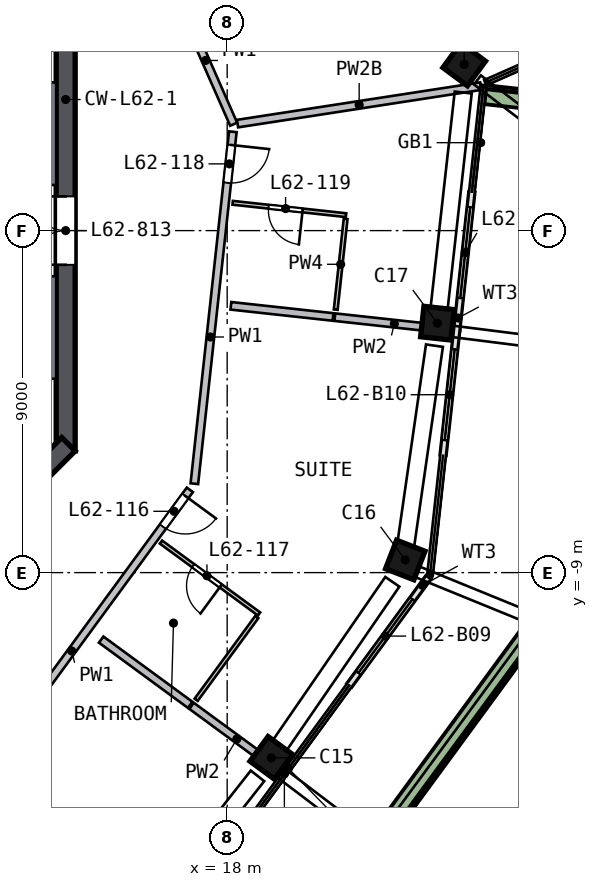
"""IFC4 building model, lengths in metres.
Left out: names, types, materials, properties, quantities, classifications, styles, units other than length and angle.
Written with IfcOpenShell. Run it as: python <this file> out.ifc"""

import sys

from ifc_helpers import new_model, si_unit, direction, frame, frame_2d, origin, origin_2d, place, context, subcontext, project, spatial, polyline, rectangle, outline, extrude, element, fill, save


model = new_model("IFC4")
c1 = context("Model", 3, precision=1e-05, world=origin(), true_north=direction((0.0, 1.0)))
c2 = subcontext(c1, "Body", "Model", "MODEL_VIEW")
j1 = project(units=[si_unit("LENGTHUNIT", "METRE"), si_unit("PLANEANGLEUNIT", "RADIAN")], contexts=[c1])
p1 = place(None, origin())
s1 = spatial("IfcSite", under=j1, at=p1, CompositionType="ELEMENT")
p2 = place(p1, origin())
s2 = spatial("IfcBuilding", under=s1, at=p2, CompositionType="ELEMENT")
p3 = place(p2, frame((0.0, 0.0, 252.5)))
s3 = spatial("IfcBuildingStorey", under=s2, at=p3, CompositionType="ELEMENT", Elevation=252.5)
p4 = place(p3, frame((19.082, -13.986, 0.0), z_axis=(0.065781659, 0.09133384, 0.99364526), x_axis=(0.587536537, 0.80133178, -0.112553082)))
e1 = element("IfcColumn", 1, at=p4, inside=s3, PredefinedType="COLUMN", context=c2, shape_type="SweptSolid", body=[
    extrude(rectangle(XDim=0.8, YDim=0.8, at=origin_2d()), origin(), (0.0, 0.0, 1.0), 3.21),
])
p5 = place(p3, frame((22.636, -8.798, 0.0), z_axis=(0.040976181, 0.107952091, 0.99331128), x_axis=(-0.360370814, -0.925635524, 0.115463211)))
e2 = element("IfcColumn", 2, at=p5, inside=s3, PredefinedType="COLUMN", context=c2, shape_type="SweptSolid", body=[
    extrude(rectangle(XDim=0.8, YDim=0.8, at=origin_2d()), origin(), (0.0, 0.0, 1.0), 3.211),
])
p6 = place(p3, frame((23.518, -2.572, 0.0), z_axis=(0.011255095, 0.112018614, 0.993642367), x_axis=(0.107722097, 0.987786416, -0.112578621)))
e3 = element("IfcColumn", 3, at=p6, inside=s3, PredefinedType="COLUMN", context=c2, shape_type="SweptSolid", body=[
    extrude(rectangle(XDim=0.8, YDim=0.8, at=origin_2d()), origin(), (0.0, 0.0, 1.0), 3.21),
])
p7 = place(p3, frame((24.262, 4.234, 0.0), z_axis=(-0.021054304, 0.115152599, 0.993124662), x_axis=(-0.595047118, -0.799688395, 0.080108669)))
e4 = element("IfcColumn", 4, at=p7, inside=s3, PredefinedType="COLUMN", context=c2, shape_type="SweptSolid", body=[
    extrude(rectangle(XDim=0.8, YDim=0.8, at=origin_2d()), origin(), (0.0, 0.0, 1.0), 3.212),
])
p8 = place(p3, frame((13.75, -5.799, 0.0), z_axis=(0.0, 0.0, 1.0), x_axis=(0.0, 1.0, 0.0)))
e5 = element("IfcWall", 5, at=p8, inside=s3, PredefinedType="SHEAR", context=c2, shape_type="SweptSolid", body=[
    extrude(rectangle(XDim=11.598, YDim=0.5, at=frame_2d((5.799, 0.0))), origin(), (0.0, 0.0, 1.0), 3.5),
])
p9 = place(p8, frame((4.899, 0.0, 0.0)))
e6 = element("IfcOpeningElement", 6, at=p9, cuts=e5, PredefinedType="OPENING", context=c2, shape_type="SweptSolid", body=[
    extrude(rectangle(XDim=1.8, YDim=2.1, at=frame_2d((0.9, 1.05))), frame((0.0, 0.26, 0.0), z_axis=(0.0, -1.0, 0.0), x_axis=(1.0, 0.0, 0.0)), (0.0, 0.0, 1.0), 0.52),
])
p10 = place(p3, frame((5.622, -13.823, 0.0), z_axis=(0.0, 0.0, 1.0), x_axis=(0.707106781, 0.707106781, 0.0)))
e7 = element("IfcWall", 7, at=p10, inside=s3, PredefinedType="SHEAR", context=c2, shape_type="SweptSolid", body=[
    extrude(rectangle(XDim=11.598, YDim=0.5, at=frame_2d((5.799, 0.0))), origin(), (0.0, 0.0, 1.0), 3.5),
])
p11 = place(p10, frame((2.099, 0.0, 0.0)))
e8 = element("IfcOpeningElement", 8, at=p11, cuts=e7, PredefinedType="OPENING", context=c2, shape_type="SweptSolid", body=[
    extrude(rectangle(XDim=1.2, YDim=2.1, at=frame_2d((0.6, 1.05))), frame((0.0, 0.26, 0.0), z_axis=(0.0, -1.0, 0.0), x_axis=(1.0, 0.0, 0.0)), (0.0, 0.0, 1.0), 0.52),
])
p12 = place(p3, frame((21.217, -11.961, 0.0), z_axis=(0.0, 0.0, 1.0), x_axis=(0.591179396, 0.806540093, 0.0)))
e9 = element("IfcWall", 9, at=p12, inside=s3, PredefinedType="SOLIDWALL", context=c2, shape_type="SweptSolid", body=[
    extrude(rectangle(XDim=3.504, YDim=0.15, at=frame_2d((1.752, 0.0))), origin(), (0.0, 0.0, 1.0), 2.525),
])
p13 = place(p12, frame((0.4, 0.0, 0.0)))
e10 = element("IfcOpeningElement", 10, at=p13, cuts=e9, PredefinedType="OPENING", context=c2, shape_type="SweptSolid", body=[
    extrude(rectangle(XDim=2.4, YDim=2.4, at=frame_2d((1.2, 1.2))), frame((0.0, 0.085, 0.0), z_axis=(0.0, -1.0, 0.0), x_axis=(1.0, 0.0, 0.0)), (0.0, 0.0, 1.0), 0.17),
])
p14 = place(p3, frame((23.681, -5.909, 0.0), z_axis=(0.0, 0.0, 1.0), x_axis=(0.108685466, 0.994076189, 0.0)))
e11 = element("IfcWall", 11, at=p14, inside=s3, PredefinedType="SOLIDWALL", context=c2, shape_type="SweptSolid", body=[
    extrude(rectangle(XDim=3.3, YDim=0.15, at=frame_2d((1.65, 0.0))), origin(), (0.0, 0.0, 1.0), 2.525),
])
p15 = place(p14, frame((0.4, 0.0, 0.0)))
e12 = element("IfcOpeningElement", 12, at=p15, cuts=e11, PredefinedType="OPENING", context=c2, shape_type="SweptSolid", body=[
    extrude(rectangle(XDim=2.4, YDim=2.4, at=frame_2d((1.2, 1.2))), frame((0.0, 0.085, 0.0), z_axis=(0.0, -1.0, 0.0), x_axis=(1.0, 0.0, 0.0)), (0.0, 0.0, 1.0), 0.17),
])
p16 = place(p3, frame((24.04, -2.629, 0.0), z_axis=(0.0, 0.0, 1.0), x_axis=(0.108689527, 0.994075745, 0.0)))
e13 = element("IfcWall", 13, at=p16, inside=s3, PredefinedType="SOLIDWALL", context=c2, shape_type="SweptSolid", body=[
    extrude(rectangle(XDim=3.661, YDim=0.15, at=frame_2d((1.831, 0.0))), origin(), (0.0, 0.0, 1.0), 2.525),
])
p17 = place(p16, frame((0.861, 0.0, 0.0)))
e14 = element("IfcOpeningElement", 14, at=p17, cuts=e13, PredefinedType="OPENING", context=c2, shape_type="SweptSolid", body=[
    extrude(rectangle(XDim=2.4, YDim=2.4, at=frame_2d((1.2, 1.2))), frame((0.0, 0.085, 0.0), z_axis=(0.0, -1.0, 0.0), x_axis=(1.0, 0.0, 0.0)), (0.0, 0.0, 1.0), 0.17),
])
p18 = place(p3, frame((18.398, -20.924, 0.0), z_axis=(0.0, 0.0, 1.0), x_axis=(0.591166749, 0.806549363, 0.0)))
e15 = element("IfcWall", 15, at=p18, inside=s3, PredefinedType="SOLIDWALL", context=c2, shape_type="SweptSolid", body=[
    extrude(rectangle(XDim=13.224, YDim=0.5, at=frame_2d((6.612, 0.0))), origin(), (0.0, 0.0, 1.0), 0.7),
])
p19 = place(p3, frame((27.478, 3.283, 0.0), z_axis=(0.0, 0.0, 1.0), x_axis=(-0.994071997, 0.108723798, 0.0)))
e16 = element("IfcWall", 16, at=p19, inside=s3, PredefinedType="SOLIDWALL", context=c2, shape_type="SweptSolid", body=[
    extrude(rectangle(XDim=2.699, YDim=0.5, at=frame_2d((1.35, 0.0))), origin(), (0.0, 0.0, 1.0), 0.7),
])
p20 = place(p3, origin())
e17 = element("IfcWall", 17, at=p20, inside=s3, PredefinedType="SOLIDWALL", context=c2, shape_type="SweptSolid", body=[
    extrude(outline(polyline([(13.5, -3.9), (9.9, -3.9), (9.9, -3.7), (12.9, -3.7), (12.9, -1.4), (9.9, -1.4), (9.9, -1.2), (13.5, -1.2), (13.5, -3.9)])), origin(), (0.0, 0.0, 1.0), 3.19),
])
p21 = place(p3, origin())
e18 = element("IfcWall", 18, at=p21, inside=s3, PredefinedType="SOLIDWALL", context=c2, shape_type="SweptSolid", body=[
    extrude(outline(polyline([(13.5, 3.9), (13.5, 1.2), (9.9, 1.2), (9.9, 1.4), (12.9, 1.4), (12.9, 3.7), (9.9, 3.7), (9.9, 3.9), (13.5, 3.9)])), origin(), (0.0, 0.0, 1.0), 3.19),
])
p22 = place(p3, frame((17.017, -6.822, 0.0), z_axis=(0.0, 0.0, 1.0), x_axis=(-0.591166262, -0.80654972, 0.0)))
e19 = element("IfcWall", 19, at=p22, inside=s3, PredefinedType="SOLIDWALL", context=c2, shape_type="SweptSolid", body=[
    extrude(rectangle(XDim=9.116, YDim=0.2, at=frame_2d((4.558, 0.0))), origin(), (0.0, 0.0, 1.0), 3.19),
])
p23 = place(p22, frame((0.2, 0.0, 0.0)))
e20 = element("IfcOpeningElement", 20, at=p23, cuts=e19, PredefinedType="OPENING", context=c2, shape_type="SweptSolid", body=[
    extrude(rectangle(XDim=1.0, YDim=2.1, at=frame_2d((0.5, 1.05))), frame((0.0, 0.11, 0.0), z_axis=(0.0, -1.0, 0.0), x_axis=(1.0, 0.0, 0.0)), (0.0, 0.0, 1.0), 0.22),
])
p24 = place(p3, frame((14.336, 11.51, 0.0), z_axis=(0.0, 0.0, 1.0), x_axis=(0.402913126, -0.915238227, 0.0)))
e21 = element("IfcWall", 21, at=p24, inside=s3, PredefinedType="SOLIDWALL", context=c2, shape_type="SweptSolid", body=[
    extrude(rectangle(XDim=9.517, YDim=0.2, at=frame_2d((4.758, 0.0))), origin(), (0.0, 0.0, 1.0), 3.19),
])
p25 = place(p24, frame((3.85, 0.0, 0.0)))
e22 = element("IfcOpeningElement", 22, at=p25, cuts=e21, PredefinedType="OPENING", context=c2, shape_type="SweptSolid", body=[
    extrude(rectangle(XDim=1.8, YDim=2.1, at=frame_2d((0.9, 1.05))), frame((0.0, 0.11, 0.0), z_axis=(0.0, -1.0, 0.0), x_axis=(1.0, 0.0, 0.0)), (0.0, 0.0, 1.0), 0.22),
])
p26 = place(p3, frame((18.149, 2.601, 0.0), z_axis=(0.0, 0.0, 1.0), x_axis=(-0.108702718, -0.994074303, 0.0)))
e23 = element("IfcWall", 23, at=p26, inside=s3, PredefinedType="SOLIDWALL", context=c2, shape_type="SweptSolid", body=[
    extrude(rectangle(XDim=9.316, YDim=0.2, at=frame_2d((4.658, 0.0))), origin(), (0.0, 0.0, 1.0), 3.19),
])
p27 = place(p26, frame((0.35, 0.0, 0.0)))
e24 = element("IfcOpeningElement", 24, at=p27, cuts=e23, PredefinedType="OPENING", context=c2, shape_type="SweptSolid", body=[
    extrude(rectangle(XDim=1.0, YDim=2.1, at=frame_2d((0.5, 1.05))), frame((0.0, 0.11, 0.0), z_axis=(0.0, -1.0, 0.0), x_axis=(1.0, 0.0, 0.0)), (0.0, 0.0, 1.0), 0.22),
])
p28 = place(p3, frame((14.684, -10.763, 0.0), z_axis=(0.0, 0.0, 1.0), x_axis=(0.806597338, -0.59110129, 0.0)))
e25 = element("IfcWall", 25, at=p28, inside=s3, PredefinedType="SOLIDWALL", context=c2, shape_type="SweptSolid", body=[
    extrude(rectangle(XDim=2.905, YDim=0.2, at=frame_2d((1.452, 0.0))), origin(), (0.0, 0.0, 1.0), 3.19),
])
p29 = place(p3, frame((17.064, -12.507, 0.0), z_axis=(0.0, 0.0, 1.0), x_axis=(0.806541701, -0.591177202, 0.0)))
e26 = element("IfcWall", 26, at=p29, inside=s3, PredefinedType="SOLIDWALL", context=c2, shape_type="SweptSolid", body=[
    extrude(rectangle(XDim=2.952, YDim=0.2, at=frame_2d((1.476, 0.0))), origin(), (0.0, 0.0, 1.0), 3.19),
])
p30 = place(p3, frame((18.098, -1.979, 0.0), z_axis=(0.0, 0.0, 1.0), x_axis=(0.994077026, -0.108677812, 0.0)))
e27 = element("IfcWall", 27, at=p30, inside=s3, PredefinedType="SOLIDWALL", context=c2, shape_type="SweptSolid", body=[
    extrude(rectangle(XDim=2.705, YDim=0.2, at=frame_2d((1.353, 0.0))), origin(), (0.0, 0.0, 1.0), 3.19),
])
p31 = place(p3, frame((24.673, 3.802, 0.0), z_axis=(0.0, 0.0, 1.0), x_axis=(-0.988332438, -0.152312151, 0.0)))
e28 = element("IfcWall", 28, at=p31, inside=s3, PredefinedType="SOLIDWALL", context=c2, shape_type="SweptSolid", body=[
    extrude(rectangle(XDim=6.476, YDim=0.2, at=frame_2d((3.238, 0.0))), origin(), (0.0, 0.0, 1.0), 2.69),
])
p32 = place(p3, frame((20.832, -2.278, 0.0), z_axis=(0.0, 0.0, 1.0), x_axis=(0.994076793, -0.108679945, 0.0)))
e29 = element("IfcWall", 29, at=p32, inside=s3, PredefinedType="SOLIDWALL", context=c2, shape_type="SweptSolid", body=[
    extrude(rectangle(XDim=3.152, YDim=0.2, at=frame_2d((1.576, 0.0))), origin(), (0.0, 0.0, 1.0), 3.19),
])
p33 = place(p3, frame((18.839, -10.088, 0.0), z_axis=(0.0, 0.0, 1.0), x_axis=(-0.806552937, 0.591161873, 0.0)))
e30 = element("IfcWall", 30, at=p33, inside=s3, PredefinedType="PARTITIONING", context=c2, shape_type="SweptSolid", body=[
    extrude(rectangle(XDim=3.2, YDim=0.1, at=frame_2d((1.6, 0.0))), origin(), (0.0, 0.0, 1.0), 3.19),
])
p34 = place(p33, frame((1.25, 0.0, 0.0)))
e31 = element("IfcOpeningElement", 31, at=p34, cuts=e30, PredefinedType="OPENING", context=c2, shape_type="SweptSolid", body=[
    extrude(rectangle(XDim=0.9, YDim=2.1, at=frame_2d((0.45, 1.05))), frame((0.0, 0.06, 0.0), z_axis=(0.0, -1.0, 0.0), x_axis=(1.0, 0.0, 0.0)), (0.0, 0.0, 1.0), 0.12),
])
p35 = place(p3, frame((18.78, -10.169, 0.0), z_axis=(0.0, 0.0, 1.0), x_axis=(-0.591210764, -0.8065171, 0.0)))
e32 = element("IfcWall", 32, at=p35, inside=s3, PredefinedType="PARTITIONING", context=c2, shape_type="SweptSolid", body=[
    extrude(rectangle(XDim=2.7, YDim=0.1, at=frame_2d((1.35, 0.0))), origin(), (0.0, 0.0, 1.0), 3.19),
])
p36 = place(p3, frame((21.128, 0.406, 0.0), z_axis=(0.0, 0.0, 1.0), x_axis=(-0.994071829, 0.108725335, 0.0)))
e33 = element("IfcWall", 33, at=p36, inside=s3, PredefinedType="PARTITIONING", context=c2, shape_type="SweptSolid", body=[
    extrude(rectangle(XDim=3.0, YDim=0.1, at=frame_2d((1.5, 0.0))), origin(), (0.0, 0.0, 1.0), 3.19),
])
p37 = place(p36, frame((1.15, 0.0, 0.0)))
e34 = element("IfcOpeningElement", 34, at=p37, cuts=e33, PredefinedType="OPENING", context=c2, shape_type="SweptSolid", body=[
    extrude(rectangle(XDim=0.9, YDim=2.1, at=frame_2d((0.45, 1.05))), frame((0.0, 0.06, 0.0), z_axis=(0.0, -1.0, 0.0), x_axis=(1.0, 0.0, 0.0)), (0.0, 0.0, 1.0), 0.12),
])
p38 = place(p3, frame((21.117, 0.307, 0.0), z_axis=(0.0, 0.0, 1.0), x_axis=(-0.108644914, -0.994080622, 0.0)))
e35 = element("IfcWall", 35, at=p38, inside=s3, PredefinedType="PARTITIONING", context=c2, shape_type="SweptSolid", body=[
    extrude(rectangle(XDim=2.4, YDim=0.1, at=frame_2d((1.2, 0.0))), origin(), (0.0, 0.0, 1.0), 3.19),
])
p39 = place(p13, origin())
e36 = element("IfcDoor", 36, at=p39, inside=s3, OperationType="SLIDING_TO_RIGHT", PredefinedType="DOOR", context=c2, shape_type="SweptSolid", body=[
    extrude(rectangle(XDim=2.4, YDim=2.4, at=frame_2d((1.2, 1.2))), frame((0.0, 0.025, 0.0), z_axis=(0.0, -1.0, 0.0), x_axis=(1.0, 0.0, 0.0)), (0.0, 0.0, 1.0), 0.05),
])
fill(e10, e36)
p40 = place(p15, origin())
e37 = element("IfcDoor", 37, at=p40, inside=s3, OperationType="SLIDING_TO_RIGHT", PredefinedType="DOOR", context=c2, shape_type="SweptSolid", body=[
    extrude(rectangle(XDim=2.4, YDim=2.4, at=frame_2d((1.2, 1.2))), frame((0.0, 0.025, 0.0), z_axis=(0.0, -1.0, 0.0), x_axis=(1.0, 0.0, 0.0)), (0.0, 0.0, 1.0), 0.05),
])
fill(e12, e37)
p41 = place(p17, origin())
e38 = element("IfcDoor", 38, at=p41, inside=s3, OperationType="SLIDING_TO_LEFT", PredefinedType="DOOR", context=c2, shape_type="SweptSolid", body=[
    extrude(rectangle(XDim=2.4, YDim=2.4, at=frame_2d((1.2, 1.2))), frame((0.0, 0.025, 0.0), z_axis=(0.0, -1.0, 0.0), x_axis=(1.0, 0.0, 0.0)), (0.0, 0.0, 1.0), 0.05),
])
fill(e14, e38)
p42 = place(p9, origin())
e39 = element("IfcDoor", 39, at=p42, inside=s3, OperationType="DOUBLE_DOOR_SINGLE_SWING", PredefinedType="DOOR", context=c2, shape_type="SweptSolid", body=[
    extrude(rectangle(XDim=1.8, YDim=2.1, at=frame_2d((0.9, 1.05))), frame((0.0, 0.025, 0.0), z_axis=(0.0, -1.0, 0.0), x_axis=(1.0, 0.0, 0.0)), (0.0, 0.0, 1.0), 0.05),
])
fill(e6, e39)
p43 = place(p23, origin())
e40 = element("IfcDoor", 40, at=p43, inside=s3, OperationType="SINGLE_SWING_LEFT", PredefinedType="DOOR", context=c2, shape_type="SweptSolid", body=[
    extrude(rectangle(XDim=1.0, YDim=2.1, at=frame_2d((0.5, 1.05))), frame((0.0, 0.025, 0.0), z_axis=(0.0, -1.0, 0.0), x_axis=(1.0, 0.0, 0.0)), (0.0, 0.0, 1.0), 0.05),
])
fill(e20, e40)
p44 = place(p34, origin())
e41 = element("IfcDoor", 41, at=p44, inside=s3, OperationType="SINGLE_SWING_LEFT", PredefinedType="DOOR", context=c2, shape_type="SweptSolid", body=[
    extrude(rectangle(XDim=0.9, YDim=2.1, at=frame_2d((0.45, 1.05))), frame((0.0, 0.025, 0.0), z_axis=(0.0, -1.0, 0.0), x_axis=(1.0, 0.0, 0.0)), (0.0, 0.0, 1.0), 0.05),
])
fill(e31, e41)
p45 = place(p27, origin())
e42 = element("IfcDoor", 42, at=p45, inside=s3, OperationType="SINGLE_SWING_LEFT", PredefinedType="DOOR", context=c2, shape_type="SweptSolid", body=[
    extrude(rectangle(XDim=1.0, YDim=2.1, at=frame_2d((0.5, 1.05))), frame((0.0, 0.025, 0.0), z_axis=(0.0, -1.0, 0.0), x_axis=(1.0, 0.0, 0.0)), (0.0, 0.0, 1.0), 0.05),
])
fill(e24, e42)
p46 = place(p37, origin())
e43 = element("IfcDoor", 43, at=p46, inside=s3, OperationType="SINGLE_SWING_LEFT", PredefinedType="DOOR", context=c2, shape_type="SweptSolid", body=[
    extrude(rectangle(XDim=0.9, YDim=2.1, at=frame_2d((0.45, 1.05))), frame((0.0, 0.025, 0.0), z_axis=(0.0, -1.0, 0.0), x_axis=(1.0, 0.0, 0.0)), (0.0, 0.0, 1.0), 0.05),
])
fill(e34, e43)
save(model, sys.argv[1])
